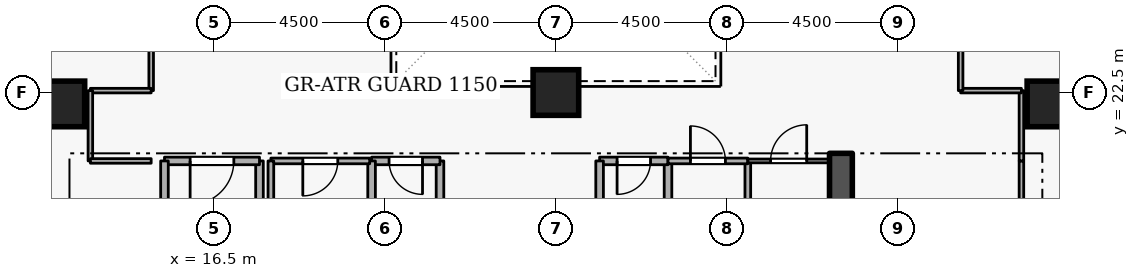
"""IFC4 building model, lengths in metres.
Left out: names, types, materials, properties, quantities, classifications, styles, units other than length and angle.
Written with IfcOpenShell. Run it as: python <this file> out.ifc"""

import sys

from ifc_helpers import new_model, si_unit, direction, frame, frame_2d, origin, origin_2d, place, context, subcontext, project, spatial, rectangle, extrude, element, fill, save


model = new_model("IFC4")
c1 = context("Model", 3, precision=1e-05, world=origin(), true_north=direction((0.0, 1.0)))
c2 = subcontext(c1, "Body", "Model", "MODEL_VIEW")
j1 = project(units=[si_unit("LENGTHUNIT", "METRE"), si_unit("PLANEANGLEUNIT", "RADIAN")], contexts=[c1])
p1 = place(None, origin())
s1 = spatial("IfcSite", under=j1, at=p1, CompositionType="ELEMENT")
p2 = place(p1, origin())
s2 = spatial("IfcBuilding", under=s1, at=p2, CompositionType="ELEMENT")
p3 = place(p2, frame((0.0, 0.0, 80.1)))
s3 = spatial("IfcBuildingStorey", under=s2, at=p3, CompositionType="ELEMENT", Elevation=80.1)
p4 = place(p3, frame((33.0, 15.2, 0.0), z_axis=(0.0, 0.0, 1.0), x_axis=(0.0, 1.0, 0.0)))
e1 = element("IfcWall", 1, at=p4, inside=s3, PredefinedType="SHEAR", context=c2, shape_type="SweptSolid", body=[
    extrude(rectangle(XDim=5.7, YDim=0.6, at=frame_2d((2.85, 0.0))), origin(), (0.0, 0.0, 1.0), 3.6),
])
for number, where, z_axis, x_axis in (
    (2, (12.5, 22.2, 0.0), (0.0, 0.0, 1.0), (1.0, 0.0, 0.0)),
    (3, (38.5, 22.2, 0.0), (0.0, 0.0, 1.0), (1.0, 0.0, 0.0)),
    (4, (25.5, 22.5, 0.0), (0.0, 0.0, 1.0), (1.0, 0.0, 0.0)),
):
    element("IfcColumn", number, at=place(p3, frame(where, z_axis=z_axis, x_axis=x_axis)), inside=s3, PredefinedType="COLUMN", context=c2, shape_type="SweptSolid", body=[
        extrude(rectangle(XDim=1.2, YDim=1.2, at=origin_2d()), origin(), (0.0, 0.0, 1.0), 3.6),
    ])
p5 = place(p3, frame((17.7, 18.4, 0.0), z_axis=(0.0, 0.0, 1.0), x_axis=(0.0, 1.0, 0.0)))
e5 = element("IfcWall", 5, at=p5, inside=s3, PredefinedType="STANDARD", context=c2, shape_type="SweptSolid", body=[
    extrude(rectangle(XDim=2.3, YDim=0.2, at=frame_2d((1.15, 0.0))), origin(), (0.0, 0.0, 1.0), 2.545),
])
p6 = place(p3, frame((17.7, 20.7, 0.0), z_axis=(0.0, 0.0, 1.0), x_axis=(-1.0, 0.0, 0.0)))
e6 = element("IfcWall", 6, at=p6, inside=s3, PredefinedType="STANDARD", context=c2, shape_type="SweptSolid", body=[
    extrude(rectangle(XDim=2.5, YDim=0.2, at=frame_2d((1.25, 0.0))), origin(), (0.0, 0.0, 1.0), 3.34),
])
p7 = place(p6, frame((0.675, 0.0, 0.0)))
e7 = element("IfcOpeningElement", 7, at=p7, cuts=e6, PredefinedType="OPENING", context=c2, shape_type="SweptSolid", body=[
    extrude(rectangle(XDim=1.15, YDim=2.1, at=frame_2d((0.575, 1.05))), frame((0.0, 0.11, 0.0), z_axis=(0.0, -1.0, 0.0), x_axis=(1.0, 0.0, 0.0)), (0.0, 0.0, 1.0), 0.22),
])
p8 = place(p3, frame((15.2, 20.7, 0.0), z_axis=(0.0, 0.0, 1.0), x_axis=(0.0, -1.0, 0.0)))
e8 = element("IfcWall", 8, at=p8, inside=s3, PredefinedType="STANDARD", context=c2, shape_type="SweptSolid", body=[
    extrude(rectangle(XDim=5.7, YDim=0.2, at=frame_2d((2.85, 0.0))), origin(), (0.0, 0.0, 1.0), 3.34),
])
p9 = place(p3, frame((28.45, 18.65, 0.0), z_axis=(0.0, 0.0, 1.0), x_axis=(0.0, 1.0, 0.0)))
e9 = element("IfcWall", 9, at=p9, inside=s3, PredefinedType="STANDARD", context=c2, shape_type="SweptSolid", body=[
    extrude(rectangle(XDim=2.05, YDim=0.2, at=frame_2d((1.025, 0.0))), origin(), (0.0, 0.0, 1.0), 3.34),
])
p10 = place(p3, frame((28.45, 20.7, 0.0), z_axis=(0.0, 0.0, 1.0), x_axis=(-1.0, 0.0, 0.0)))
e10 = element("IfcWall", 10, at=p10, inside=s3, PredefinedType="STANDARD", context=c2, shape_type="SweptSolid", body=[
    extrude(rectangle(XDim=1.8, YDim=0.2, at=frame_2d((0.9, 0.0))), origin(), (0.0, 0.0, 1.0), 3.34),
])
p11 = place(p10, frame((0.46, 0.0, 0.0)))
e11 = element("IfcOpeningElement", 11, at=p11, cuts=e10, PredefinedType="OPENING", context=c2, shape_type="SweptSolid", body=[
    extrude(rectangle(XDim=0.88, YDim=2.04, at=frame_2d((0.44, 1.02))), frame((0.0, 0.11, 0.0), z_axis=(0.0, -1.0, 0.0), x_axis=(1.0, 0.0, 0.0)), (0.0, 0.0, 1.0), 0.22),
])
for number, where, z_axis, x_axis in (
    (12, (26.65, 20.7, 0.0), (0.0, 0.0, 1.0), (0.0, -1.0, 0.0)),
    (13, (22.45, 18.65, 0.0), (0.0, 0.0, 1.0), (0.0, 1.0, 0.0)),
):
    element("IfcWall", number, at=place(p3, frame(where, z_axis=z_axis, x_axis=x_axis)), inside=s3, PredefinedType="STANDARD", context=c2, shape_type="SweptSolid", body=[
        extrude(rectangle(XDim=2.05, YDim=0.2, at=frame_2d((1.025, 0.0))), origin(), (0.0, 0.0, 1.0), 3.34),
    ])
p12 = place(p3, frame((22.45, 20.7, 0.0), z_axis=(0.0, 0.0, 1.0), x_axis=(-1.0, 0.0, 0.0)))
e14 = element("IfcWall", 14, at=p12, inside=s3, PredefinedType="STANDARD", context=c2, shape_type="SweptSolid", body=[
    extrude(rectangle(XDim=1.8, YDim=0.2, at=frame_2d((0.9, 0.0))), origin(), (0.0, 0.0, 1.0), 3.34),
])
p13 = place(p12, frame((0.46, 0.0, 0.0)))
e15 = element("IfcOpeningElement", 15, at=p13, cuts=e14, PredefinedType="OPENING", context=c2, shape_type="SweptSolid", body=[
    extrude(rectangle(XDim=0.88, YDim=2.04, at=frame_2d((0.44, 1.02))), frame((0.0, 0.11, 0.0), z_axis=(0.0, -1.0, 0.0), x_axis=(1.0, 0.0, 0.0)), (0.0, 0.0, 1.0), 0.22),
])
p14 = place(p3, frame((20.65, 20.7, 0.0), z_axis=(0.0, 0.0, 1.0), x_axis=(0.0, -1.0, 0.0)))
e16 = element("IfcWall", 16, at=p14, inside=s3, PredefinedType="STANDARD", context=c2, shape_type="SweptSolid", body=[
    extrude(rectangle(XDim=2.05, YDim=0.2, at=frame_2d((1.025, 0.0))), origin(), (0.0, 0.0, 1.0), 3.34),
])
p15 = place(p3, frame((20.6, 20.7, 0.0), z_axis=(0.0, 0.0, 1.0), x_axis=(-1.0, 0.0, 0.0)))
e17 = element("IfcWall", 17, at=p15, inside=s3, PredefinedType="PARTITIONING", context=c2, shape_type="SweptSolid", body=[
    extrude(rectangle(XDim=2.6, YDim=0.15, at=frame_2d((1.3, 0.0))), origin(), (0.0, 0.0, 1.0), 3.34),
])
p16 = place(p15, frame((0.84, 0.0, 0.0)))
e18 = element("IfcOpeningElement", 18, at=p16, cuts=e17, PredefinedType="OPENING", context=c2, shape_type="SweptSolid", body=[
    extrude(rectangle(XDim=0.92, YDim=2.08, at=frame_2d((0.46, 1.04))), frame((0.0, 0.085, 0.0), z_axis=(0.0, -1.0, 0.0), x_axis=(1.0, 0.0, 0.0)), (0.0, 0.0, 1.0), 0.17),
])
p17 = place(p3, frame((18.0, 20.7, 0.0), z_axis=(0.0, 0.0, 1.0), x_axis=(0.0, -1.0, 0.0)))
e19 = element("IfcWall", 19, at=p17, inside=s3, PredefinedType="PARTITIONING", context=c2, shape_type="SweptSolid", body=[
    extrude(rectangle(XDim=2.05, YDim=0.15, at=frame_2d((1.025, 0.0))), origin(), (0.0, 0.0, 1.0), 2.545),
])
p18 = place(p3, frame((30.55, 20.7, 0.0), z_axis=(0.0, 0.0, 1.0), x_axis=(0.0, -1.0, 0.0)))
e20 = element("IfcWall", 20, at=p18, inside=s3, PredefinedType="PARTITIONING", context=c2, shape_type="SweptSolid", body=[
    extrude(rectangle(XDim=2.05, YDim=0.15, at=frame_2d((1.025, 0.0))), origin(), (0.0, 0.0, 1.0), 3.34),
])
p19 = place(p3, frame((28.45, 20.7, 0.0), z_axis=(0.0, 0.0, 1.0), x_axis=(1.0, 0.0, 0.0)))
e21 = element("IfcWall", 21, at=p19, inside=s3, PredefinedType="PARTITIONING", context=c2, shape_type="SweptSolid", body=[
    extrude(rectangle(XDim=2.1, YDim=0.15, at=frame_2d((1.05, 0.0))), origin(), (0.0, 0.0, 1.0), 3.34),
])
p20 = place(p19, frame((0.59, 0.0, 0.0)))
e22 = element("IfcOpeningElement", 22, at=p20, cuts=e21, PredefinedType="OPENING", context=c2, shape_type="SweptSolid", body=[
    extrude(rectangle(XDim=0.92, YDim=2.08, at=frame_2d((0.46, 1.04))), frame((0.0, 0.085, 0.0), z_axis=(0.0, -1.0, 0.0), x_axis=(1.0, 0.0, 0.0)), (0.0, 0.0, 1.0), 0.17),
])
p21 = place(p3, frame((30.55, 20.7, 0.0), z_axis=(0.0, 0.0, 1.0), x_axis=(1.0, 0.0, 0.0)))
e23 = element("IfcWall", 23, at=p21, inside=s3, PredefinedType="PARTITIONING", context=c2, shape_type="SweptSolid", body=[
    extrude(rectangle(XDim=2.15, YDim=0.1, at=frame_2d((1.075, 0.0))), origin(), (0.0, 0.0, 1.0), 3.34),
])
p22 = place(p21, frame((0.6, 0.0, 0.0)))
e24 = element("IfcOpeningElement", 24, at=p22, cuts=e23, PredefinedType="OPENING", context=c2, shape_type="SweptSolid", body=[
    extrude(rectangle(XDim=0.95, YDim=2.1, at=frame_2d((0.475, 1.05))), frame((0.0, 0.06, 0.0), z_axis=(0.0, -1.0, 0.0), x_axis=(1.0, 0.0, 0.0)), (0.0, 0.0, 1.0), 0.12),
])
p23 = place(p3, frame((14.85, 27.0, 0.0), z_axis=(0.0, 0.0, 1.0), x_axis=(0.0, -1.0, 0.0)))
e25 = element("IfcWall", 25, at=p23, inside=s3, PredefinedType="PARTITIONING", context=c2, shape_type="SweptSolid", body=[
    extrude(rectangle(XDim=4.45, YDim=0.12, at=frame_2d((2.225, 0.0))), origin(), (0.0, 0.0, 1.0), 3.34),
])
p24 = place(p23, frame((1.7, 0.0, 0.0)))
e26 = element("IfcOpeningElement", 26, at=p24, cuts=e25, PredefinedType="OPENING", context=c2, shape_type="SweptSolid", body=[
    extrude(rectangle(XDim=1.05, YDim=2.1, at=frame_2d((0.525, 1.05))), frame((0.0, 0.07, 0.0), z_axis=(0.0, -1.0, 0.0), x_axis=(1.0, 0.0, 0.0)), (0.0, 0.0, 1.0), 0.14),
])
p25 = place(p3, frame((14.85, 22.55, 0.0), z_axis=(0.0, 0.0, 1.0), x_axis=(-1.0, 0.0, 0.0)))
e27 = element("IfcWall", 27, at=p25, inside=s3, PredefinedType="PARTITIONING", context=c2, shape_type="SweptSolid", body=[
    extrude(rectangle(XDim=1.6, YDim=0.12, at=frame_2d((0.8, 0.0))), origin(), (0.0, 0.0, 1.0), 3.34),
])
p26 = place(p3, frame((13.25, 22.55, 0.0), z_axis=(0.0, 0.0, 1.0), x_axis=(0.0, -1.0, 0.0)))
e28 = element("IfcWall", 28, at=p26, inside=s3, PredefinedType="PARTITIONING", context=c2, shape_type="SweptSolid", body=[
    extrude(rectangle(XDim=1.85, YDim=0.12, at=frame_2d((0.925, 0.0))), origin(), (0.0, 0.0, 1.0), 3.34),
])
p27 = place(p3, frame((13.25, 20.7, 0.0), z_axis=(0.0, 0.0, 1.0), x_axis=(1.0, 0.0, 0.0)))
e29 = element("IfcWall", 29, at=p27, inside=s3, PredefinedType="PARTITIONING", context=c2, shape_type="SweptSolid", body=[
    extrude(rectangle(XDim=1.6, YDim=0.12, at=frame_2d((0.8, 0.0))), origin(), (0.0, 0.0, 1.0), 3.34),
])
p28 = place(p3, frame((37.75, 17.55, 0.0), z_axis=(0.0, 0.0, 1.0), x_axis=(0.0, 1.0, 0.0)))
e30 = element("IfcWall", 30, at=p28, inside=s3, PredefinedType="PARTITIONING", context=c2, shape_type="SweptSolid", body=[
    extrude(rectangle(XDim=3.15, YDim=0.12, at=frame_2d((1.575, 0.0))), origin(), (0.0, 0.0, 1.0), 3.34),
])
p29 = place(p3, frame((37.75, 20.7, 0.0), z_axis=(0.0, 0.0, 1.0), x_axis=(0.0, 1.0, 0.0)))
e31 = element("IfcWall", 31, at=p29, inside=s3, PredefinedType="PARTITIONING", context=c2, shape_type="SweptSolid", body=[
    extrude(rectangle(XDim=1.85, YDim=0.12, at=frame_2d((0.925, 0.0))), origin(), (0.0, 0.0, 1.0), 3.34),
])
p30 = place(p3, frame((37.75, 22.55, 0.0), z_axis=(0.0, 0.0, 1.0), x_axis=(-1.0, 0.0, 0.0)))
e32 = element("IfcWall", 32, at=p30, inside=s3, PredefinedType="PARTITIONING", context=c2, shape_type="SweptSolid", body=[
    extrude(rectangle(XDim=1.6, YDim=0.12, at=frame_2d((0.8, 0.0))), origin(), (0.0, 0.0, 1.0), 3.34),
])
p31 = place(p3, frame((36.15, 22.55, 0.0), z_axis=(0.0, 0.0, 1.0), x_axis=(0.0, 1.0, 0.0)))
e33 = element("IfcWall", 33, at=p31, inside=s3, PredefinedType="PARTITIONING", context=c2, shape_type="SweptSolid", body=[
    extrude(rectangle(XDim=4.45, YDim=0.12, at=frame_2d((2.225, 0.0))), origin(), (0.0, 0.0, 1.0), 3.34),
])
p32 = place(p31, frame((1.7, 0.0, 0.0)))
e34 = element("IfcOpeningElement", 34, at=p32, cuts=e33, PredefinedType="OPENING", context=c2, shape_type="SweptSolid", body=[
    extrude(rectangle(XDim=1.05, YDim=2.1, at=frame_2d((0.525, 1.05))), frame((0.0, 0.07, 0.0), z_axis=(0.0, -1.0, 0.0), x_axis=(1.0, 0.0, 0.0)), (0.0, 0.0, 1.0), 0.14),
])
p33 = place(p7, origin())
e35 = element("IfcDoor", 35, at=p33, inside=s3, OperationType="SINGLE_SWING_RIGHT", PredefinedType="DOOR", context=c2, shape_type="SweptSolid", body=[
    extrude(rectangle(XDim=1.15, YDim=2.1, at=frame_2d((0.575, 1.05))), frame((0.0, 0.025, 0.0), z_axis=(0.0, -1.0, 0.0), x_axis=(1.0, 0.0, 0.0)), (0.0, 0.0, 1.0), 0.05),
])
fill(e7, e35)
p34 = place(p11, origin())
e36 = element("IfcDoor", 36, at=p34, inside=s3, OperationType="SINGLE_SWING_RIGHT", PredefinedType="DOOR", context=c2, shape_type="SweptSolid", body=[
    extrude(rectangle(XDim=0.88, YDim=2.04, at=frame_2d((0.44, 1.02))), frame((0.0, 0.025, 0.0), z_axis=(0.0, -1.0, 0.0), x_axis=(1.0, 0.0, 0.0)), (0.0, 0.0, 1.0), 0.05),
])
fill(e11, e36)
p35 = place(p13, origin())
e37 = element("IfcDoor", 37, at=p35, inside=s3, OperationType="SINGLE_SWING_LEFT", PredefinedType="DOOR", context=c2, shape_type="SweptSolid", body=[
    extrude(rectangle(XDim=0.88, YDim=2.04, at=frame_2d((0.44, 1.02))), frame((0.0, 0.025, 0.0), z_axis=(0.0, -1.0, 0.0), x_axis=(1.0, 0.0, 0.0)), (0.0, 0.0, 1.0), 0.05),
])
fill(e15, e37)
p36 = place(p16, origin())
e38 = element("IfcDoor", 38, at=p36, inside=s3, OperationType="SINGLE_SWING_RIGHT", PredefinedType="DOOR", context=c2, shape_type="SweptSolid", body=[
    extrude(rectangle(XDim=0.92, YDim=2.08, at=frame_2d((0.46, 1.04))), frame((0.0, 0.025, 0.0), z_axis=(0.0, -1.0, 0.0), x_axis=(1.0, 0.0, 0.0)), (0.0, 0.0, 1.0), 0.05),
])
fill(e18, e38)
p37 = place(p20, origin())
e39 = element("IfcDoor", 39, at=p37, inside=s3, OperationType="SINGLE_SWING_LEFT", PredefinedType="DOOR", context=c2, shape_type="SweptSolid", body=[
    extrude(rectangle(XDim=0.92, YDim=2.08, at=frame_2d((0.46, 1.04))), frame((0.0, 0.025, 0.0), z_axis=(0.0, -1.0, 0.0), x_axis=(1.0, 0.0, 0.0)), (0.0, 0.0, 1.0), 0.05),
])
fill(e22, e39)
p38 = place(p22, origin())
e40 = element("IfcDoor", 40, at=p38, inside=s3, OperationType="SINGLE_SWING_RIGHT", PredefinedType="DOOR", context=c2, shape_type="SweptSolid", body=[
    extrude(rectangle(XDim=0.95, YDim=2.1, at=frame_2d((0.475, 1.05))), frame((0.0, 0.025, 0.0), z_axis=(0.0, -1.0, 0.0), x_axis=(1.0, 0.0, 0.0)), (0.0, 0.0, 1.0), 0.05),
])
fill(e24, e40)
save(model, sys.argv[1])
